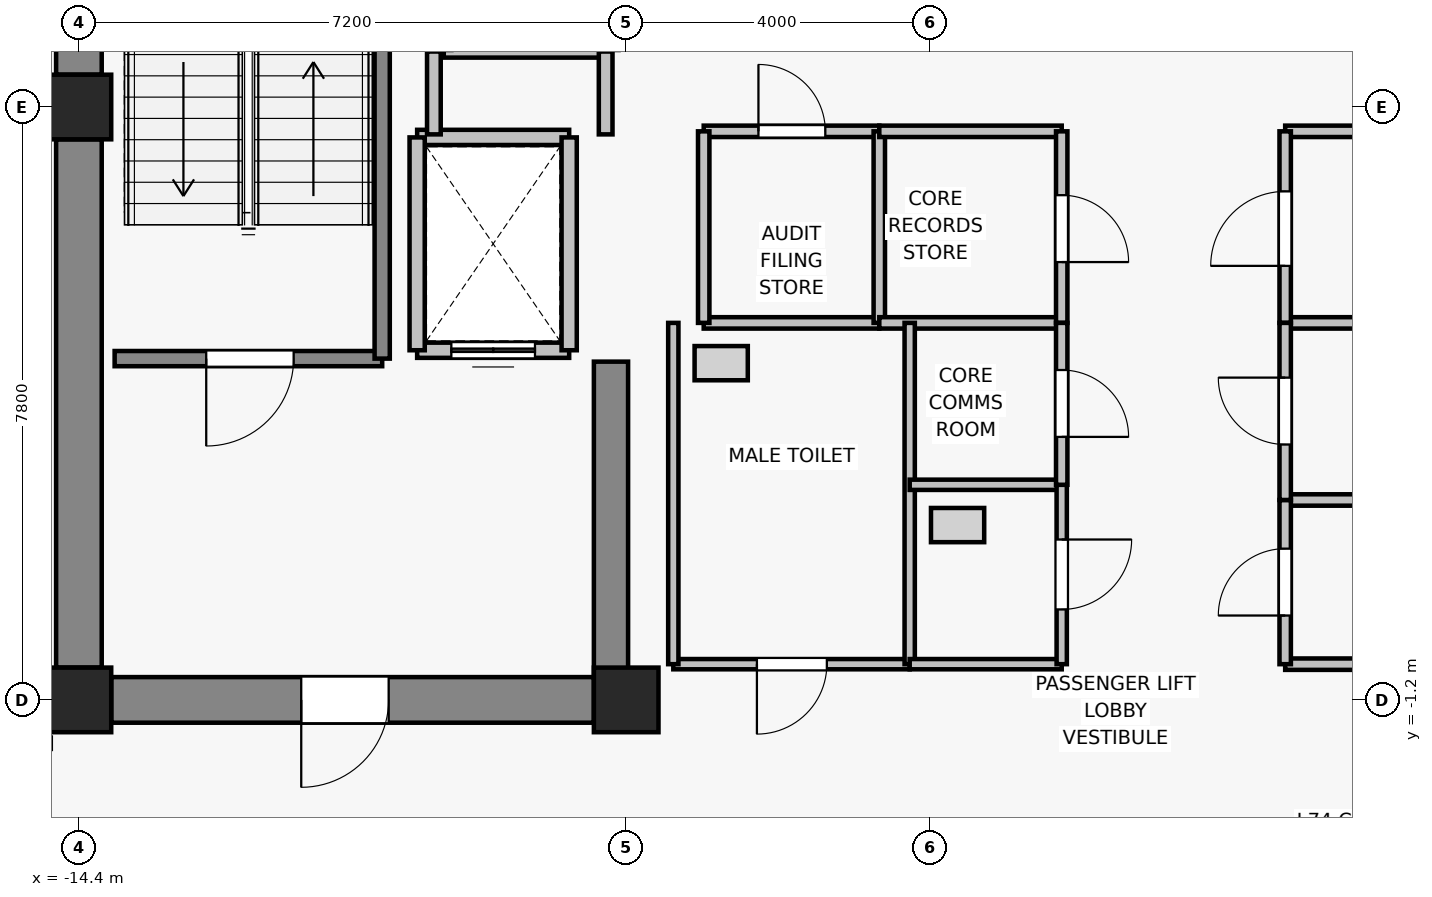
"""IFC4 building model, lengths in metres.
Left out: names, types, materials, properties, quantities, classifications, styles, units other than length and angle.
Written with IfcOpenShell. Run it as: python <this file> out.ifc"""

import sys

from ifc_helpers import new_model, si_unit, direction, frame, frame_2d, origin, origin_2d, place, context, subcontext, project, spatial, rectangle, extrude, source, transform, mapped, element, fill, save


model = new_model("IFC4")
c1 = context("Model", 3, precision=1e-05, world=origin(), true_north=direction((0.0, 1.0)))
c2 = subcontext(c1, "Body", "Model", "MODEL_VIEW")
j1 = project(units=[si_unit("LENGTHUNIT", "METRE"), si_unit("PLANEANGLEUNIT", "RADIAN")], contexts=[c1])
p1 = place(None, origin())
s1 = spatial("IfcSite", under=j1, at=p1, CompositionType="ELEMENT")
p2 = place(p1, origin())
s2 = spatial("IfcBuilding", under=s1, at=p2, CompositionType="ELEMENT")
p3 = place(p2, frame((0.0, 0.0, 261.7)))
s3 = spatial("IfcBuildingStorey", under=s2, at=p3, CompositionType="ELEMENT", Elevation=261.7)
for number, where, z_axis, x_axis in (
    (1, (-14.4, -1.2, 0.0), (0.0, 0.0, 1.0), (1.0, 0.0, 0.0)),
    (2, (-7.2, -1.2, 0.0), (0.0, 0.0, 1.0), (1.0, 0.0, 0.0)),
    (3, (-14.4, 6.6, 0.0), (0.0, 0.0, 1.0), (1.0, 0.0, 0.0)),
):
    element("IfcColumn", number, at=place(p3, frame(where, z_axis=z_axis, x_axis=x_axis)), inside=s3, PredefinedType="COLUMN", context=c2, shape_type="SweptSolid", body=[
        extrude(rectangle(XDim=0.85, YDim=0.85, at=origin_2d()), origin(), (0.0, 0.0, 1.0), 3.3),
    ])
p4 = place(p3, frame((-14.4, -0.775, 0.0), z_axis=(0.0, 0.0, 1.0), x_axis=(0.0, 1.0, 0.0)))
e4 = element("IfcWall", 4, at=p4, inside=s3, PredefinedType="SHEAR", context=c2, shape_type="SweptSolid", body=[
    extrude(rectangle(XDim=6.95, YDim=0.6, at=frame_2d((3.475, 0.0))), origin(), (0.0, 0.0, 1.0), 3.075),
])
p5 = place(p3, frame((-14.4, 7.025, 0.0), z_axis=(0.0, 0.0, 1.0), x_axis=(0.0, 1.0, 0.0)))
e5 = element("IfcWall", 5, at=p5, inside=s3, PredefinedType="SHEAR", context=c2, shape_type="SweptSolid", body=[
    extrude(rectangle(XDim=6.05, YDim=0.6, at=frame_2d((3.025, 0.0))), origin(), (0.0, 0.0, 1.0), 3.075),
])
p6 = place(p3, frame((-7.625, -1.2, 0.0), z_axis=(0.0, 0.0, 1.0), x_axis=(-1.0, 0.0, 0.0)))
e6 = element("IfcWall", 6, at=p6, inside=s3, PredefinedType="SHEAR", context=c2, shape_type="SweptSolid", body=[
    extrude(rectangle(XDim=6.35, YDim=0.6, at=frame_2d((3.175, 0.0))), origin(), (0.0, 0.0, 1.0), 3.075),
])
p7 = place(p6, frame((2.7, 0.0, 0.0)))
e7 = element("IfcOpeningElement", 7, at=p7, cuts=e6, PredefinedType="OPENING", context=c2, shape_type="SweptSolid", body=[
    extrude(rectangle(XDim=1.15, YDim=2.15, at=frame_2d((0.575, 1.075))), frame((0.0, 0.31, 0.0), z_axis=(0.0, -1.0, 0.0), x_axis=(1.0, 0.0, 0.0)), (0.0, 0.0, 1.0), 0.62),
])
p8 = place(p3, frame((-7.4, -0.9, 0.0), z_axis=(0.0, 0.0, 1.0), x_axis=(0.0, 1.0, 0.0)))
e8 = element("IfcWall", 8, at=p8, inside=s3, PredefinedType="SHEAR", context=c2, shape_type="SweptSolid", body=[
    extrude(rectangle(XDim=4.15, YDim=0.45, at=frame_2d((2.075, 0.0))), origin(), (0.0, 0.0, 1.0), 3.075),
])
p9 = place(p3, frame((-7.95, 3.4, 0.0), z_axis=(0.0, 0.0, 1.0), x_axis=(-1.0, 0.0, 0.0)))
e9 = element("IfcWall", 9, at=p9, inside=s3, PredefinedType="SOLIDWALL", context=c2, shape_type="SweptSolid", body=[
    extrude(rectangle(XDim=2.0, YDim=0.2, at=frame_2d((1.0, 0.0))), origin(), (0.0, 0.0, 1.0), 3.075),
])
p10 = place(p9, frame((0.45, 0.0, 0.0)))
e10 = element("IfcOpeningElement", 10, at=p10, cuts=e9, PredefinedType="OPENING", context=c2, shape_type="SweptSolid", body=[
    extrude(rectangle(XDim=1.1, YDim=2.2, at=frame_2d((0.55, 1.1))), frame((0.0, 0.11, 0.0), z_axis=(0.0, -1.0, 0.0), x_axis=(1.0, 0.0, 0.0)), (0.0, 0.0, 1.0), 0.22),
])
p11 = place(p3, frame((-9.95, 6.2, 0.0), z_axis=(0.0, 0.0, 1.0), x_axis=(1.0, 0.0, 0.0)))
e11 = element("IfcWall", 11, at=p11, inside=s3, PredefinedType="SOLIDWALL", context=c2, shape_type="SweptSolid", body=[
    extrude(rectangle(XDim=2.0, YDim=0.2, at=frame_2d((1.0, 0.0))), origin(), (0.0, 0.0, 1.0), 3.075),
])
for number, where, z_axis, x_axis in (
    (12, (-9.95, 3.4, 0.0), (0.0, 0.0, 1.0), (0.0, 1.0, 0.0)),
    (13, (-7.95, 6.2, 0.0), (0.0, 0.0, 1.0), (0.0, -1.0, 0.0)),
):
    element("IfcWall", number, at=place(p3, frame(where, z_axis=z_axis, x_axis=x_axis)), inside=s3, PredefinedType="SOLIDWALL", context=c2, shape_type="SweptSolid", body=[
        extrude(rectangle(XDim=2.8, YDim=0.2, at=frame_2d((1.4, 0.0))), origin(), (0.0, 0.0, 1.0), 3.075),
    ])
p12 = place(p3, frame((-7.4, 7.35, 0.0), z_axis=(0.0, 0.0, 1.0), x_axis=(-1.0, 0.0, 0.0)))
e14 = element("IfcWall", 14, at=p12, inside=s3, PredefinedType="SOLIDWALL", context=c2, shape_type="SweptSolid", body=[
    extrude(rectangle(XDim=2.2, YDim=0.2, at=frame_2d((1.1, 0.0))), origin(), (0.0, 0.0, 1.0), 2.615),
])
p13 = place(p3, frame((-10.41, 3.29, 0.0), z_axis=(0.0, 0.0, 1.0), x_axis=(-1.0, 0.0, 0.0)))
e15 = element("IfcWall", 15, at=p13, inside=s3, PredefinedType="SOLIDWALL", context=c2, shape_type="SweptSolid", body=[
    extrude(rectangle(XDim=3.52, YDim=0.2, at=frame_2d((1.76, 0.0))), origin(), (0.0, 0.0, 1.0), 3.075),
])
p14 = place(p13, frame((1.165, 0.0, 0.0)))
e16 = element("IfcOpeningElement", 16, at=p14, cuts=e15, PredefinedType="OPENING", context=c2, shape_type="SweptSolid", body=[
    extrude(rectangle(XDim=1.15, YDim=2.15, at=frame_2d((0.575, 1.075))), frame((0.0, 0.11, 0.0), z_axis=(0.0, -1.0, 0.0), x_axis=(1.0, 0.0, 0.0)), (0.0, 0.0, 1.0), 0.22),
])
p15 = place(p3, frame((-10.41, 12.13, 0.0), z_axis=(0.0, 0.0, 1.0), x_axis=(0.0, -1.0, 0.0)))
e17 = element("IfcWall", 17, at=p15, inside=s3, PredefinedType="SOLIDWALL", context=c2, shape_type="SweptSolid", body=[
    extrude(rectangle(XDim=8.84, YDim=0.2, at=frame_2d((4.42, 0.0))), origin(), (0.0, 0.0, 1.0), 3.075),
])
p16 = place(p3, frame((-9.73, 6.24, 0.0), z_axis=(0.0, 0.0, 1.0), x_axis=(0.0, 1.0, 0.0)))
e18 = element("IfcWall", 18, at=p16, inside=s3, PredefinedType="PARTITIONING", context=c2, shape_type="SweptSolid", body=[
    extrude(rectangle(XDim=1.09, YDim=0.18, at=frame_2d((0.545, 0.0))), origin(), (0.0, 0.0, 1.0), 3.075),
])
p17 = place(p3, frame((-7.47, 7.33, 0.0), z_axis=(0.0, 0.0, 1.0), x_axis=(0.0, -1.0, 0.0)))
e19 = element("IfcWall", 19, at=p17, inside=s3, PredefinedType="PARTITIONING", context=c2, shape_type="SweptSolid", body=[
    extrude(rectangle(XDim=1.09, YDim=0.18, at=frame_2d((0.545, 0.0))), origin(), (0.0, 0.0, 1.0), 2.615),
])
p18 = place(p3, frame((-3.87, 3.76, 0.0), z_axis=(0.0, 0.0, 1.0), x_axis=(-1.0, 0.0, 0.0)))
e20 = element("IfcWall", 20, at=p18, inside=s3, PredefinedType="PARTITIONING", context=c2, shape_type="SweptSolid", body=[
    extrude(rectangle(XDim=2.31, YDim=0.15, at=frame_2d((1.155, 0.0))), origin(), (0.0, 0.0, 1.0), 3.075),
])
p19 = place(p3, frame((-6.18, 6.28, 0.0), z_axis=(0.0, 0.0, 1.0), x_axis=(1.0, 0.0, 0.0)))
e21 = element("IfcWall", 21, at=p19, inside=s3, PredefinedType="PARTITIONING", context=c2, shape_type="SweptSolid", body=[
    extrude(rectangle(XDim=2.31, YDim=0.15, at=frame_2d((1.155, 0.0))), origin(), (0.0, 0.0, 1.0), 3.075),
])
p20 = place(p19, frame((0.72, 0.0, 0.0)))
e22 = element("IfcOpeningElement", 22, at=p20, cuts=e21, PredefinedType="OPENING", context=c2, shape_type="SweptSolid", body=[
    extrude(rectangle(XDim=0.88, YDim=2.1, at=frame_2d((0.44, 1.05))), frame((0.0, 0.085, 0.0), z_axis=(0.0, -1.0, 0.0), x_axis=(1.0, 0.0, 0.0)), (0.0, 0.0, 1.0), 0.17),
])
for number, where, z_axis, x_axis in (
    (23, (-6.18, 3.76, 0.0), (0.0, 0.0, 1.0), (0.0, 1.0, 0.0)),
    (24, (-3.87, 6.28, 0.0), (0.0, 0.0, 1.0), (0.0, -1.0, 0.0)),
):
    element("IfcWall", number, at=place(p3, frame(where, z_axis=z_axis, x_axis=x_axis)), inside=s3, PredefinedType="PARTITIONING", context=c2, shape_type="SweptSolid", body=[
        extrude(rectangle(XDim=2.52, YDim=0.15, at=frame_2d((1.26, 0.0))), origin(), (0.0, 0.0, 1.0), 3.075),
    ])
for number, where, z_axis, x_axis in (
    (25, (-1.47, 3.76, 0.0), (0.0, 0.0, 1.0), (-1.0, 0.0, 0.0)),
    (26, (-3.87, 6.28, 0.0), (0.0, 0.0, 1.0), (1.0, 0.0, 0.0)),
):
    element("IfcWall", number, at=place(p3, frame(where, z_axis=z_axis, x_axis=x_axis)), inside=s3, PredefinedType="PARTITIONING", context=c2, shape_type="SweptSolid", body=[
        extrude(rectangle(XDim=2.4, YDim=0.15, at=frame_2d((1.2, 0.0))), origin(), (0.0, 0.0, 1.0), 3.075),
    ])
p21 = place(p3, frame((-1.47, 6.28, 0.0), z_axis=(0.0, 0.0, 1.0), x_axis=(0.0, -1.0, 0.0)))
e27 = element("IfcWall", 27, at=p21, inside=s3, PredefinedType="PARTITIONING", context=c2, shape_type="SweptSolid", body=[
    extrude(rectangle(XDim=2.52, YDim=0.15, at=frame_2d((1.26, 0.0))), origin(), (0.0, 0.0, 1.0), 3.075),
])
p22 = place(p21, frame((0.84, 0.0, 0.0)))
e28 = element("IfcOpeningElement", 28, at=p22, cuts=e27, PredefinedType="OPENING", context=c2, shape_type="SweptSolid", body=[
    extrude(rectangle(XDim=0.88, YDim=2.1, at=frame_2d((0.44, 1.05))), frame((0.0, 0.085, 0.0), z_axis=(0.0, -1.0, 0.0), x_axis=(1.0, 0.0, 0.0)), (0.0, 0.0, 1.0), 0.17),
])
for number, where, z_axis, x_axis in (
    (29, (6.38, 3.76, 0.0), (0.0, 0.0, 1.0), (-1.0, 0.0, 0.0)),
    (30, (1.47, 6.28, 0.0), (0.0, 0.0, 1.0), (1.0, 0.0, 0.0)),
):
    element("IfcWall", number, at=place(p3, frame(where, z_axis=z_axis, x_axis=x_axis)), inside=s3, PredefinedType="PARTITIONING", context=c2, shape_type="SweptSolid", body=[
        extrude(rectangle(XDim=4.91, YDim=0.15, at=frame_2d((2.455, 0.0))), origin(), (0.0, 0.0, 1.0), 3.075),
    ])
p23 = place(p3, frame((1.47, 3.76, 0.0), z_axis=(0.0, 0.0, 1.0), x_axis=(0.0, 1.0, 0.0)))
e31 = element("IfcWall", 31, at=p23, inside=s3, PredefinedType="PARTITIONING", context=c2, shape_type="SweptSolid", body=[
    extrude(rectangle(XDim=2.52, YDim=0.15, at=frame_2d((1.26, 0.0))), origin(), (0.0, 0.0, 1.0), 3.075),
])
p24 = place(p23, frame((0.75, 0.0, 0.0)))
e32 = element("IfcOpeningElement", 32, at=p24, cuts=e31, PredefinedType="OPENING", context=c2, shape_type="SweptSolid", body=[
    extrude(rectangle(XDim=0.98, YDim=2.15, at=frame_2d((0.49, 1.075))), frame((0.0, 0.085, 0.0), z_axis=(0.0, -1.0, 0.0), x_axis=(1.0, 0.0, 0.0)), (0.0, 0.0, 1.0), 0.17),
])
p25 = place(p3, frame((-3.47, -0.73, 0.0), z_axis=(0.0, 0.0, 1.0), x_axis=(-1.0, 0.0, 0.0)))
e33 = element("IfcWall", 33, at=p25, inside=s3, PredefinedType="PARTITIONING", context=c2, shape_type="SweptSolid", body=[
    extrude(rectangle(XDim=3.11, YDim=0.135, at=frame_2d((1.555, 0.0))), origin(), (0.0, 0.0, 1.0), 3.075),
])
p26 = place(p25, frame((1.09, 0.0, 0.0)))
e34 = element("IfcOpeningElement", 34, at=p26, cuts=e33, PredefinedType="OPENING", context=c2, shape_type="SweptSolid", body=[
    extrude(rectangle(XDim=0.92, YDim=2.1, at=frame_2d((0.46, 1.05))), frame((0.0, 0.077, 0.0), z_axis=(0.0, -1.0, 0.0), x_axis=(1.0, 0.0, 0.0)), (0.0, 0.0, 1.0), 0.155),
])
for number, where, z_axis, x_axis in (
    (35, (-6.58, -0.73, 0.0), (0.0, 0.0, 1.0), (0.0, 1.0, 0.0)),
    (36, (-3.47, 3.76, 0.0), (0.0, 0.0, 1.0), (0.0, -1.0, 0.0)),
):
    element("IfcWall", number, at=place(p3, frame(where, z_axis=z_axis, x_axis=x_axis)), inside=s3, PredefinedType="PARTITIONING", context=c2, shape_type="SweptSolid", body=[
        extrude(rectangle(XDim=4.49, YDim=0.135, at=frame_2d((2.245, 0.0))), origin(), (0.0, 0.0, 1.0), 3.075),
    ])
for number, where, z_axis, x_axis in (
    (37, (-1.47, -0.73, 0.0), (0.0, 0.0, 1.0), (-1.0, 0.0, 0.0)),
    (38, (-3.47, 1.63, 0.0), (0.0, 0.0, 1.0), (1.0, 0.0, 0.0)),
):
    element("IfcWall", number, at=place(p3, frame(where, z_axis=z_axis, x_axis=x_axis)), inside=s3, PredefinedType="PARTITIONING", context=c2, shape_type="SweptSolid", body=[
        extrude(rectangle(XDim=2.0, YDim=0.135, at=frame_2d((1.0, 0.0))), origin(), (0.0, 0.0, 1.0), 3.075),
    ])
p27 = place(p3, frame((-1.47, 1.63, 0.0), z_axis=(0.0, 0.0, 1.0), x_axis=(0.0, -1.0, 0.0)))
e39 = element("IfcWall", 39, at=p27, inside=s3, PredefinedType="PARTITIONING", context=c2, shape_type="SweptSolid", body=[
    extrude(rectangle(XDim=2.36, YDim=0.135, at=frame_2d((1.18, 0.0))), origin(), (0.0, 0.0, 1.0), 3.075),
])
p28 = place(p27, frame((0.72, 0.0, 0.0)))
e40 = element("IfcOpeningElement", 40, at=p28, cuts=e39, PredefinedType="OPENING", context=c2, shape_type="SweptSolid", body=[
    extrude(rectangle(XDim=0.92, YDim=2.1, at=frame_2d((0.46, 1.05))), frame((0.0, 0.077, 0.0), z_axis=(0.0, -1.0, 0.0), x_axis=(1.0, 0.0, 0.0)), (0.0, 0.0, 1.0), 0.155),
])
p29 = place(p3, frame((-1.47, 3.76, 0.0), z_axis=(0.0, 0.0, 1.0), x_axis=(0.0, -1.0, 0.0)))
e41 = element("IfcWall", 41, at=p29, inside=s3, PredefinedType="PARTITIONING", context=c2, shape_type="SweptSolid", body=[
    extrude(rectangle(XDim=2.13, YDim=0.15, at=frame_2d((1.065, 0.0))), origin(), (0.0, 0.0, 1.0), 3.075),
])
p30 = place(p29, frame((0.62, 0.0, 0.0)))
e42 = element("IfcOpeningElement", 42, at=p30, cuts=e41, PredefinedType="OPENING", context=c2, shape_type="SweptSolid", body=[
    extrude(rectangle(XDim=0.88, YDim=2.1, at=frame_2d((0.44, 1.05))), frame((0.0, 0.085, 0.0), z_axis=(0.0, -1.0, 0.0), x_axis=(1.0, 0.0, 0.0)), (0.0, 0.0, 1.0), 0.17),
])
for number, where, z_axis, x_axis in (
    (43, (3.68, -0.73, 0.0), (0.0, 0.0, 1.0), (-1.0, 0.0, 0.0)),
    (44, (1.47, 1.43, 0.0), (0.0, 0.0, 1.0), (1.0, 0.0, 0.0)),
):
    element("IfcWall", number, at=place(p3, frame(where, z_axis=z_axis, x_axis=x_axis)), inside=s3, PredefinedType="PARTITIONING", context=c2, shape_type="SweptSolid", body=[
        extrude(rectangle(XDim=2.21, YDim=0.15, at=frame_2d((1.105, 0.0))), origin(), (0.0, 0.0, 1.0), 3.075),
    ])
p31 = place(p3, frame((1.47, -0.73, 0.0), z_axis=(0.0, 0.0, 1.0), x_axis=(0.0, 1.0, 0.0)))
e45 = element("IfcWall", 45, at=p31, inside=s3, PredefinedType="PARTITIONING", context=c2, shape_type="SweptSolid", body=[
    extrude(rectangle(XDim=2.16, YDim=0.15, at=frame_2d((1.08, 0.0))), origin(), (0.0, 0.0, 1.0), 3.075),
])
p32 = place(p31, frame((0.64, 0.0, 0.0)))
e46 = element("IfcOpeningElement", 46, at=p32, cuts=e45, PredefinedType="OPENING", context=c2, shape_type="SweptSolid", body=[
    extrude(rectangle(XDim=0.88, YDim=2.1, at=frame_2d((0.44, 1.05))), frame((0.0, 0.085, 0.0), z_axis=(0.0, -1.0, 0.0), x_axis=(1.0, 0.0, 0.0)), (0.0, 0.0, 1.0), 0.17),
])
p33 = place(p3, frame((1.47, 1.43, 0.0), z_axis=(0.0, 0.0, 1.0), x_axis=(0.0, 1.0, 0.0)))
e47 = element("IfcWall", 47, at=p33, inside=s3, PredefinedType="PARTITIONING", context=c2, shape_type="SweptSolid", body=[
    extrude(rectangle(XDim=2.33, YDim=0.15, at=frame_2d((1.165, 0.0))), origin(), (0.0, 0.0, 1.0), 3.075),
])
p34 = place(p33, frame((0.73, 0.0, 0.0)))
e48 = element("IfcOpeningElement", 48, at=p34, cuts=e47, PredefinedType="OPENING", context=c2, shape_type="SweptSolid", body=[
    extrude(rectangle(XDim=0.88, YDim=2.15, at=frame_2d((0.44, 1.075))), frame((0.0, 0.085, 0.0), z_axis=(0.0, -1.0, 0.0), x_axis=(1.0, 0.0, 0.0)), (0.0, 0.0, 1.0), 0.17),
])
m1 = source(origin(), c2, "Body", "SweptSolid", [
    extrude(rectangle(XDim=1.1, YDim=2.2, at=frame_2d((0.55, 1.1))), frame((0.0, 0.025, 0.0), z_axis=(0.0, -1.0, 0.0), x_axis=(1.0, 0.0, 0.0)), (0.0, 0.0, 1.0), 0.05),
])
p35 = place(p10, origin())
e49 = element("IfcDoor", 49, at=p35, inside=s3, OperationType="DOUBLE_DOOR_SLIDING", PredefinedType="DOOR", context=c2, shape_type="MappedRepresentation", body=[
    mapped(m1, transform((0.0, 0.0, 0.0), x_axis=(1.0, 0.0, 0.0), y_axis=(0.0, 1.0, 0.0), z_axis=(0.0, 0.0, 1.0), scale=1.0)),
])
fill(e10, e49)
m2 = source(origin(), c2, "Body", "SweptSolid", [
    extrude(rectangle(XDim=1.15, YDim=2.15, at=frame_2d((0.575, 1.075))), frame((0.0, 0.025, 0.0), z_axis=(0.0, -1.0, 0.0), x_axis=(1.0, 0.0, 0.0)), (0.0, 0.0, 1.0), 0.05),
])
p36 = place(p14, origin())
e50 = element("IfcDoor", 50, at=p36, inside=s3, OperationType="SINGLE_SWING_RIGHT", PredefinedType="DOOR", context=c2, shape_type="MappedRepresentation", body=[
    mapped(m2, transform((0.0, 0.0, 0.0), x_axis=(1.0, 0.0, 0.0), y_axis=(0.0, 1.0, 0.0), z_axis=(0.0, 0.0, 1.0), scale=1.0)),
])
fill(e16, e50)
p37 = place(p7, origin())
e51 = element("IfcDoor", 51, at=p37, inside=s3, OperationType="SINGLE_SWING_RIGHT", PredefinedType="DOOR", context=c2, shape_type="MappedRepresentation", body=[
    mapped(m2, transform((0.0, 0.0, 0.0), x_axis=(1.0, 0.0, 0.0), y_axis=(0.0, 1.0, 0.0), z_axis=(0.0, 0.0, 1.0), scale=1.0)),
])
fill(e7, e51)
m3 = source(origin(), c2, "Body", "SweptSolid", [
    extrude(rectangle(XDim=0.88, YDim=2.1, at=frame_2d((0.44, 1.05))), frame((0.0, 0.025, 0.0), z_axis=(0.0, -1.0, 0.0), x_axis=(1.0, 0.0, 0.0)), (0.0, 0.0, 1.0), 0.05),
])
p38 = place(p20, origin())
e52 = element("IfcDoor", 52, at=p38, inside=s3, OperationType="SINGLE_SWING_LEFT", PredefinedType="DOOR", context=c2, shape_type="MappedRepresentation", body=[
    mapped(m3, transform((0.0, 0.0, 0.0), x_axis=(1.0, 0.0, 0.0), y_axis=(0.0, 1.0, 0.0), z_axis=(0.0, 0.0, 1.0), scale=1.0)),
])
fill(e22, e52)
p39 = place(p22, origin())
e53 = element("IfcDoor", 53, at=p39, inside=s3, OperationType="SINGLE_SWING_RIGHT", PredefinedType="DOOR", context=c2, shape_type="MappedRepresentation", body=[
    mapped(m3, transform((0.0, 0.0, 0.0), x_axis=(1.0, 0.0, 0.0), y_axis=(0.0, 1.0, 0.0), z_axis=(0.0, 0.0, 1.0), scale=1.0)),
])
fill(e28, e53)
m4 = source(origin(), c2, "Body", "SweptSolid", [
    extrude(rectangle(XDim=0.98, YDim=2.15, at=frame_2d((0.49, 1.075))), frame((0.0, 0.025, 0.0), z_axis=(0.0, -1.0, 0.0), x_axis=(1.0, 0.0, 0.0)), (0.0, 0.0, 1.0), 0.05),
])
p40 = place(p24, origin())
e54 = element("IfcDoor", 54, at=p40, inside=s3, OperationType="SINGLE_SWING_LEFT", PredefinedType="DOOR", context=c2, shape_type="MappedRepresentation", body=[
    mapped(m4, transform((0.0, 0.0, 0.0), x_axis=(1.0, 0.0, 0.0), y_axis=(0.0, 1.0, 0.0), z_axis=(0.0, 0.0, 1.0), scale=1.0)),
])
fill(e32, e54)
m5 = source(origin(), c2, "Body", "SweptSolid", [
    extrude(rectangle(XDim=0.92, YDim=2.1, at=frame_2d((0.46, 1.05))), frame((0.0, 0.025, 0.0), z_axis=(0.0, -1.0, 0.0), x_axis=(1.0, 0.0, 0.0)), (0.0, 0.0, 1.0), 0.05),
])
p41 = place(p26, origin())
e55 = element("IfcDoor", 55, at=p41, inside=s3, OperationType="SINGLE_SWING_RIGHT", PredefinedType="DOOR", context=c2, shape_type="MappedRepresentation", body=[
    mapped(m5, transform((0.0, 0.0, 0.0), x_axis=(1.0, 0.0, 0.0), y_axis=(0.0, 1.0, 0.0), z_axis=(0.0, 0.0, 1.0), scale=1.0)),
])
fill(e34, e55)
p42 = place(p28, origin())
e56 = element("IfcDoor", 56, at=p42, inside=s3, OperationType="SINGLE_SWING_LEFT", PredefinedType="DOOR", context=c2, shape_type="MappedRepresentation", body=[
    mapped(m5, transform((0.0, 0.0, 0.0), x_axis=(1.0, 0.0, 0.0), y_axis=(0.0, 1.0, 0.0), z_axis=(0.0, 0.0, 1.0), scale=1.0)),
])
fill(e40, e56)
p43 = place(p30, origin())
e57 = element("IfcDoor", 57, at=p43, inside=s3, OperationType="SINGLE_SWING_RIGHT", PredefinedType="DOOR", context=c2, shape_type="MappedRepresentation", body=[
    mapped(m3, transform((0.0, 0.0, 0.0), x_axis=(1.0, 0.0, 0.0), y_axis=(0.0, 1.0, 0.0), z_axis=(0.0, 0.0, 1.0), scale=1.0)),
])
fill(e42, e57)
p44 = place(p32, origin())
e58 = element("IfcDoor", 58, at=p44, inside=s3, OperationType="SINGLE_SWING_LEFT", PredefinedType="DOOR", context=c2, shape_type="MappedRepresentation", body=[
    mapped(m3, transform((0.0, 0.0, 0.0), x_axis=(1.0, 0.0, 0.0), y_axis=(0.0, 1.0, 0.0), z_axis=(0.0, 0.0, 1.0), scale=1.0)),
])
fill(e46, e58)
m6 = source(origin(), c2, "Body", "SweptSolid", [
    extrude(rectangle(XDim=0.88, YDim=2.15, at=frame_2d((0.44, 1.075))), frame((0.0, 0.025, 0.0), z_axis=(0.0, -1.0, 0.0), x_axis=(1.0, 0.0, 0.0)), (0.0, 0.0, 1.0), 0.05),
])
p45 = place(p34, origin())
e59 = element("IfcDoor", 59, at=p45, inside=s3, OperationType="SINGLE_SWING_RIGHT", PredefinedType="DOOR", context=c2, shape_type="MappedRepresentation", body=[
    mapped(m6, transform((0.0, 0.0, 0.0), x_axis=(1.0, 0.0, 0.0), y_axis=(0.0, 1.0, 0.0), z_axis=(0.0, 0.0, 1.0), scale=1.0)),
])
fill(e48, e59)
save(model, sys.argv[1])
